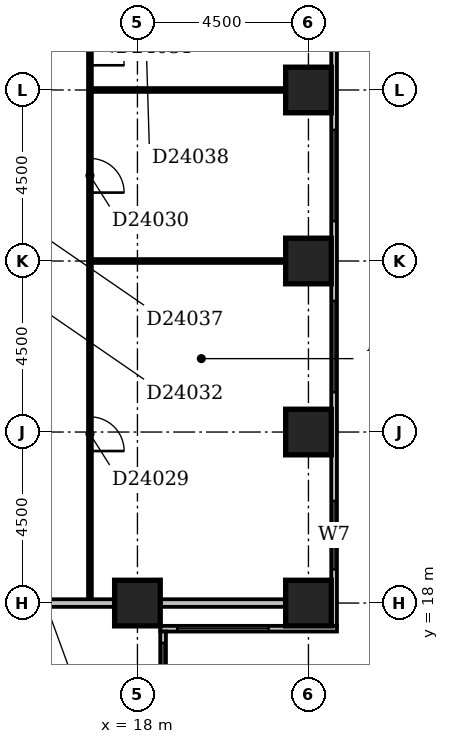
"""IFC4 building model, lengths in metres.
Left out: names, types, materials, properties, quantities, classifications, styles, units other than length and angle.
Written with IfcOpenShell. Run it as: python <this file> out.ifc"""

import sys

from ifc_helpers import new_model, si_unit, direction, frame, frame_2d, origin, origin_2d, place, context, subcontext, project, spatial, rectangle, extrude, element, fill, save


model = new_model("IFC4")
c1 = context("Model", 3, precision=1e-05, world=origin(), true_north=direction((0.0, 1.0)))
c2 = subcontext(c1, "Body", "Model", "MODEL_VIEW")
j1 = project(units=[si_unit("LENGTHUNIT", "METRE"), si_unit("PLANEANGLEUNIT", "RADIAN")], contexts=[c1])
p1 = place(None, origin())
s1 = spatial("IfcSite", under=j1, at=p1, CompositionType="ELEMENT")
p2 = place(p1, origin())
s2 = spatial("IfcBuilding", under=s1, at=p2, CompositionType="ELEMENT")
p3 = place(p2, frame((0.0, 0.0, 97.4)))
s3 = spatial("IfcBuildingStorey", under=s2, at=p3, CompositionType="ELEMENT", Elevation=97.4)
for number, where, z_axis, x_axis in (
    (1, (18.0, 18.0, -0.3), (0.0, 0.0, 1.0), (1.0, 0.0, 0.0)),
    (2, (22.5, 18.0, -0.3), (0.0, 0.0, 1.0), (1.0, 0.0, 0.0)),
    (3, (22.5, 22.5, -0.3), (0.0, 0.0, 1.0), (1.0, 0.0, 0.0)),
    (4, (22.5, 27.0, -0.3), (0.0, 0.0, 1.0), (1.0, 0.0, 0.0)),
    (5, (22.5, 31.5, -0.3), (0.0, 0.0, 1.0), (1.0, 0.0, 0.0)),
):
    element("IfcColumn", number, at=place(p3, frame(where, z_axis=z_axis, x_axis=x_axis)), inside=s3, PredefinedType="COLUMN", context=c2, shape_type="SweptSolid", body=[
        extrude(rectangle(XDim=1.2, YDim=1.2, at=origin_2d()), origin(), (0.0, 0.0, 1.0), 3.6),
    ])
p4 = place(p3, frame((18.675, 8.4, 0.0), z_axis=(0.0, 0.0, 1.0), x_axis=(0.0, 1.0, 0.0)))
e6 = element("IfcWall", 6, at=p4, inside=s3, PredefinedType="STANDARD", context=c2, shape_type="SweptSolid", body=[
    extrude(rectangle(XDim=8.85, YDim=0.15, at=frame_2d((4.425, 0.0))), origin(), (0.0, 0.0, 1.0), 2.7),
])
p5 = place(p4, frame((3.022, 0.0, 0.6)))
e7 = element("IfcOpeningElement", 7, at=p5, cuts=e6, PredefinedType="OPENING", context=c2, shape_type="SweptSolid", body=[
    extrude(rectangle(XDim=1.2, YDim=1.8, at=frame_2d((0.6, 0.9))), frame((0.0, 0.087, 0.0), z_axis=(0.0, -1.0, 0.0), x_axis=(1.0, 0.0, 0.0)), (0.0, 0.0, 1.0), 0.174),
])
p6 = place(p4, frame((6.15, 0.0, 0.6)))
e8 = element("IfcOpeningElement", 8, at=p6, cuts=e6, PredefinedType="OPENING", context=c2, shape_type="SweptSolid", body=[
    extrude(rectangle(XDim=2.4, YDim=1.8, at=frame_2d((1.2, 0.9))), frame((0.0, 0.087, 0.0), z_axis=(0.0, -1.0, 0.0), x_axis=(1.0, 0.0, 0.0)), (0.0, 0.0, 1.0), 0.174),
])
p7 = place(p3, frame((18.6, 17.325, 0.0), z_axis=(0.0, 0.0, 1.0), x_axis=(1.0, 0.0, 0.0)))
e9 = element("IfcWall", 9, at=p7, inside=s3, PredefinedType="STANDARD", context=c2, shape_type="SweptSolid", body=[
    extrude(rectangle(XDim=4.65, YDim=0.15, at=frame_2d((2.325, 0.0))), origin(), (0.0, 0.0, 1.0), 2.7),
])
p8 = place(p7, frame((0.45, 0.0, 0.6)))
e10 = element("IfcOpeningElement", 10, at=p8, cuts=e9, PredefinedType="OPENING", context=c2, shape_type="SweptSolid", body=[
    extrude(rectangle(XDim=2.4, YDim=1.8, at=frame_2d((1.2, 0.9))), frame((0.0, 0.087, 0.0), z_axis=(0.0, -1.0, 0.0), x_axis=(1.0, 0.0, 0.0)), (0.0, 0.0, 1.0), 0.174),
])
p9 = place(p3, frame((23.175, 17.4, 0.0), z_axis=(0.0, 0.0, 1.0), x_axis=(0.0, 1.0, 0.0)))
e11 = element("IfcWall", 11, at=p9, inside=s3, PredefinedType="STANDARD", context=c2, shape_type="SweptSolid", body=[
    extrude(rectangle(XDim=17.85, YDim=0.15, at=frame_2d((8.925, 0.0))), origin(), (0.0, 0.0, 1.0), 2.7),
])
p10 = place(p9, frame((1.487, 0.0, 0.6)))
e12 = element("IfcOpeningElement", 12, at=p10, cuts=e11, PredefinedType="OPENING", context=c2, shape_type="SweptSolid", body=[
    extrude(rectangle(XDim=1.8, YDim=1.8, at=frame_2d((0.9, 0.9))), frame((0.0, 0.087, 0.0), z_axis=(0.0, -1.0, 0.0), x_axis=(1.0, 0.0, 0.0)), (0.0, 0.0, 1.0), 0.174),
])
p11 = place(p9, frame((6.15, 0.0, 0.6)))
e13 = element("IfcOpeningElement", 13, at=p11, cuts=e11, PredefinedType="OPENING", context=c2, shape_type="SweptSolid", body=[
    extrude(rectangle(XDim=2.4, YDim=1.8, at=frame_2d((1.2, 0.9))), frame((0.0, 0.087, 0.0), z_axis=(0.0, -1.0, 0.0), x_axis=(1.0, 0.0, 0.0)), (0.0, 0.0, 1.0), 0.174),
])
p12 = place(p9, frame((10.65, 0.0, 0.6)))
e14 = element("IfcOpeningElement", 14, at=p12, cuts=e11, PredefinedType="OPENING", context=c2, shape_type="SweptSolid", body=[
    extrude(rectangle(XDim=2.4, YDim=1.8, at=frame_2d((1.2, 0.9))), frame((0.0, 0.087, 0.0), z_axis=(0.0, -1.0, 0.0), x_axis=(1.0, 0.0, 0.0)), (0.0, 0.0, 1.0), 0.174),
])
p13 = place(p9, frame((15.15, 0.0, 0.6)))
e15 = element("IfcOpeningElement", 15, at=p13, cuts=e11, PredefinedType="OPENING", context=c2, shape_type="SweptSolid", body=[
    extrude(rectangle(XDim=2.4, YDim=1.8, at=frame_2d((1.2, 0.9))), frame((0.0, 0.087, 0.0), z_axis=(0.0, -1.0, 0.0), x_axis=(1.0, 0.0, 0.0)), (0.0, 0.0, 1.0), 0.174),
])
p14 = place(p3, frame((9.1, 18.0, 0.0), z_axis=(0.0, 0.0, 1.0), x_axis=(1.0, 0.0, 0.0)))
e16 = element("IfcWall", 16, at=p14, inside=s3, PredefinedType="PARTITIONING", context=c2, shape_type="SweptSolid", body=[
    extrude(rectangle(XDim=8.3, YDim=0.2, at=frame_2d((4.15, 0.0))), origin(), (0.0, 0.0, 1.0), 2.6),
])
p15 = place(p3, frame((18.6, 18.0, 0.0), z_axis=(0.0, 0.0, 1.0), x_axis=(1.0, 0.0, 0.0)))
e17 = element("IfcWall", 17, at=p15, inside=s3, PredefinedType="PARTITIONING", context=c2, shape_type="SweptSolid", body=[
    extrude(rectangle(XDim=3.3, YDim=0.2, at=frame_2d((1.65, 0.0))), origin(), (0.0, 0.0, 1.0), 2.7),
])
p16 = place(p3, frame((16.75, 18.1, 0.0), z_axis=(0.0, 0.0, 1.0), x_axis=(0.0, 1.0, 0.0)))
e18 = element("IfcWall", 18, at=p16, inside=s3, PredefinedType="PARTITIONING", context=c2, shape_type="SweptSolid", body=[
    extrude(rectangle(XDim=17.8, YDim=0.1, at=frame_2d((8.9, 0.0))), origin(), (0.0, 0.0, 1.0), 3.3),
])
p17 = place(p16, frame((3.9, 0.0, 0.0)))
e19 = element("IfcOpeningElement", 19, at=p17, cuts=e18, PredefinedType="OPENING", context=c2, shape_type="SweptSolid", body=[
    extrude(rectangle(XDim=0.9, YDim=2.1, at=frame_2d((0.45, 1.05))), frame((0.0, 0.062, 0.0), z_axis=(0.0, -1.0, 0.0), x_axis=(1.0, 0.0, 0.0)), (0.0, 0.0, 1.0), 0.124),
])
p18 = place(p16, frame((10.7, 0.0, 0.0)))
e20 = element("IfcOpeningElement", 20, at=p18, cuts=e18, PredefinedType="OPENING", context=c2, shape_type="SweptSolid", body=[
    extrude(rectangle(XDim=0.9, YDim=2.1, at=frame_2d((0.45, 1.05))), frame((0.0, 0.062, 0.0), z_axis=(0.0, -1.0, 0.0), x_axis=(1.0, 0.0, 0.0)), (0.0, 0.0, 1.0), 0.124),
])
p19 = place(p16, frame((14.05, 0.0, 0.0)))
e21 = element("IfcOpeningElement", 21, at=p19, cuts=e18, PredefinedType="OPENING", context=c2, shape_type="SweptSolid", body=[
    extrude(rectangle(XDim=0.9, YDim=2.1, at=frame_2d((0.45, 1.05))), frame((0.0, 0.062, 0.0), z_axis=(0.0, -1.0, 0.0), x_axis=(1.0, 0.0, 0.0)), (0.0, 0.0, 1.0), 0.124),
])
p20 = place(p3, frame((16.8, 27.0, 0.0), z_axis=(0.0, 0.0, 1.0), x_axis=(1.0, 0.0, 0.0)))
e22 = element("IfcWall", 22, at=p20, inside=s3, PredefinedType="PARTITIONING", context=c2, shape_type="SweptSolid", body=[
    extrude(rectangle(XDim=5.1, YDim=0.1, at=frame_2d((2.55, 0.0))), origin(), (0.0, 0.0, 1.0), 2.7),
])
p21 = place(p3, frame((16.8, 31.5, 0.0), z_axis=(0.0, 0.0, 1.0), x_axis=(1.0, 0.0, 0.0)))
e23 = element("IfcWall", 23, at=p21, inside=s3, PredefinedType="PARTITIONING", context=c2, shape_type="SweptSolid", body=[
    extrude(rectangle(XDim=5.1, YDim=0.1, at=frame_2d((2.55, 0.0))), origin(), (0.0, 0.0, 1.0), 3.3),
])
p22 = place(p6, origin())
e24 = element("IfcWindow", 24, at=p22, inside=s3, PartitioningType="SINGLE_PANEL", PredefinedType="WINDOW", context=c2, shape_type="SweptSolid", body=[
    extrude(rectangle(XDim=2.4, YDim=1.8, at=frame_2d((1.2, 0.9))), frame((0.0, 0.03, 0.0), z_axis=(0.0, -1.0, 0.0), x_axis=(1.0, 0.0, 0.0)), (0.0, 0.0, 1.0), 0.06),
])
fill(e8, e24)
p23 = place(p8, origin())
e25 = element("IfcWindow", 25, at=p23, inside=s3, PartitioningType="SINGLE_PANEL", PredefinedType="WINDOW", context=c2, shape_type="SweptSolid", body=[
    extrude(rectangle(XDim=2.4, YDim=1.8, at=frame_2d((1.2, 0.9))), frame((0.0, 0.03, 0.0), z_axis=(0.0, -1.0, 0.0), x_axis=(1.0, 0.0, 0.0)), (0.0, 0.0, 1.0), 0.06),
])
fill(e10, e25)
p24 = place(p10, origin())
e26 = element("IfcWindow", 26, at=p24, inside=s3, PartitioningType="SINGLE_PANEL", PredefinedType="WINDOW", context=c2, shape_type="SweptSolid", body=[
    extrude(rectangle(XDim=1.8, YDim=1.8, at=frame_2d((0.9, 0.9))), frame((0.0, 0.03, 0.0), z_axis=(0.0, -1.0, 0.0), x_axis=(1.0, 0.0, 0.0)), (0.0, 0.0, 1.0), 0.06),
])
fill(e12, e26)
p25 = place(p11, origin())
e27 = element("IfcWindow", 27, at=p25, inside=s3, PartitioningType="SINGLE_PANEL", PredefinedType="WINDOW", context=c2, shape_type="SweptSolid", body=[
    extrude(rectangle(XDim=2.4, YDim=1.8, at=frame_2d((1.2, 0.9))), frame((0.0, 0.03, 0.0), z_axis=(0.0, -1.0, 0.0), x_axis=(1.0, 0.0, 0.0)), (0.0, 0.0, 1.0), 0.06),
])
fill(e13, e27)
p26 = place(p12, origin())
e28 = element("IfcWindow", 28, at=p26, inside=s3, PartitioningType="SINGLE_PANEL", PredefinedType="WINDOW", context=c2, shape_type="SweptSolid", body=[
    extrude(rectangle(XDim=2.4, YDim=1.8, at=frame_2d((1.2, 0.9))), frame((0.0, 0.03, 0.0), z_axis=(0.0, -1.0, 0.0), x_axis=(1.0, 0.0, 0.0)), (0.0, 0.0, 1.0), 0.06),
])
fill(e14, e28)
p27 = place(p17, frame((0.9, 0.0, 0.0), z_axis=(0.0, 0.0, 1.0), x_axis=(-1.0, 0.0, 0.0)))
e29 = element("IfcDoor", 29, at=p27, inside=s3, OperationType="SINGLE_SWING_RIGHT", PredefinedType="DOOR", context=c2, shape_type="SweptSolid", body=[
    extrude(rectangle(XDim=0.9, YDim=2.1, at=frame_2d((0.45, 1.05))), frame((0.0, 0.025, 0.0), z_axis=(0.0, -1.0, 0.0), x_axis=(1.0, 0.0, 0.0)), (0.0, 0.0, 1.0), 0.05),
])
fill(e19, e29)
p28 = place(p18, frame((0.9, 0.0, 0.0), z_axis=(0.0, 0.0, 1.0), x_axis=(-1.0, 0.0, 0.0)))
e30 = element("IfcDoor", 30, at=p28, inside=s3, OperationType="SINGLE_SWING_RIGHT", PredefinedType="DOOR", context=c2, shape_type="SweptSolid", body=[
    extrude(rectangle(XDim=0.9, YDim=2.1, at=frame_2d((0.45, 1.05))), frame((0.0, 0.025, 0.0), z_axis=(0.0, -1.0, 0.0), x_axis=(1.0, 0.0, 0.0)), (0.0, 0.0, 1.0), 0.05),
])
fill(e20, e30)
p29 = place(p19, frame((0.9, 0.0, 0.0), z_axis=(0.0, 0.0, 1.0), x_axis=(-1.0, 0.0, 0.0)))
e31 = element("IfcDoor", 31, at=p29, inside=s3, OperationType="SINGLE_SWING_RIGHT", PredefinedType="DOOR", context=c2, shape_type="SweptSolid", body=[
    extrude(rectangle(XDim=0.9, YDim=2.1, at=frame_2d((0.45, 1.05))), frame((0.0, 0.025, 0.0), z_axis=(0.0, -1.0, 0.0), x_axis=(1.0, 0.0, 0.0)), (0.0, 0.0, 1.0), 0.05),
])
fill(e21, e31)
save(model, sys.argv[1])
